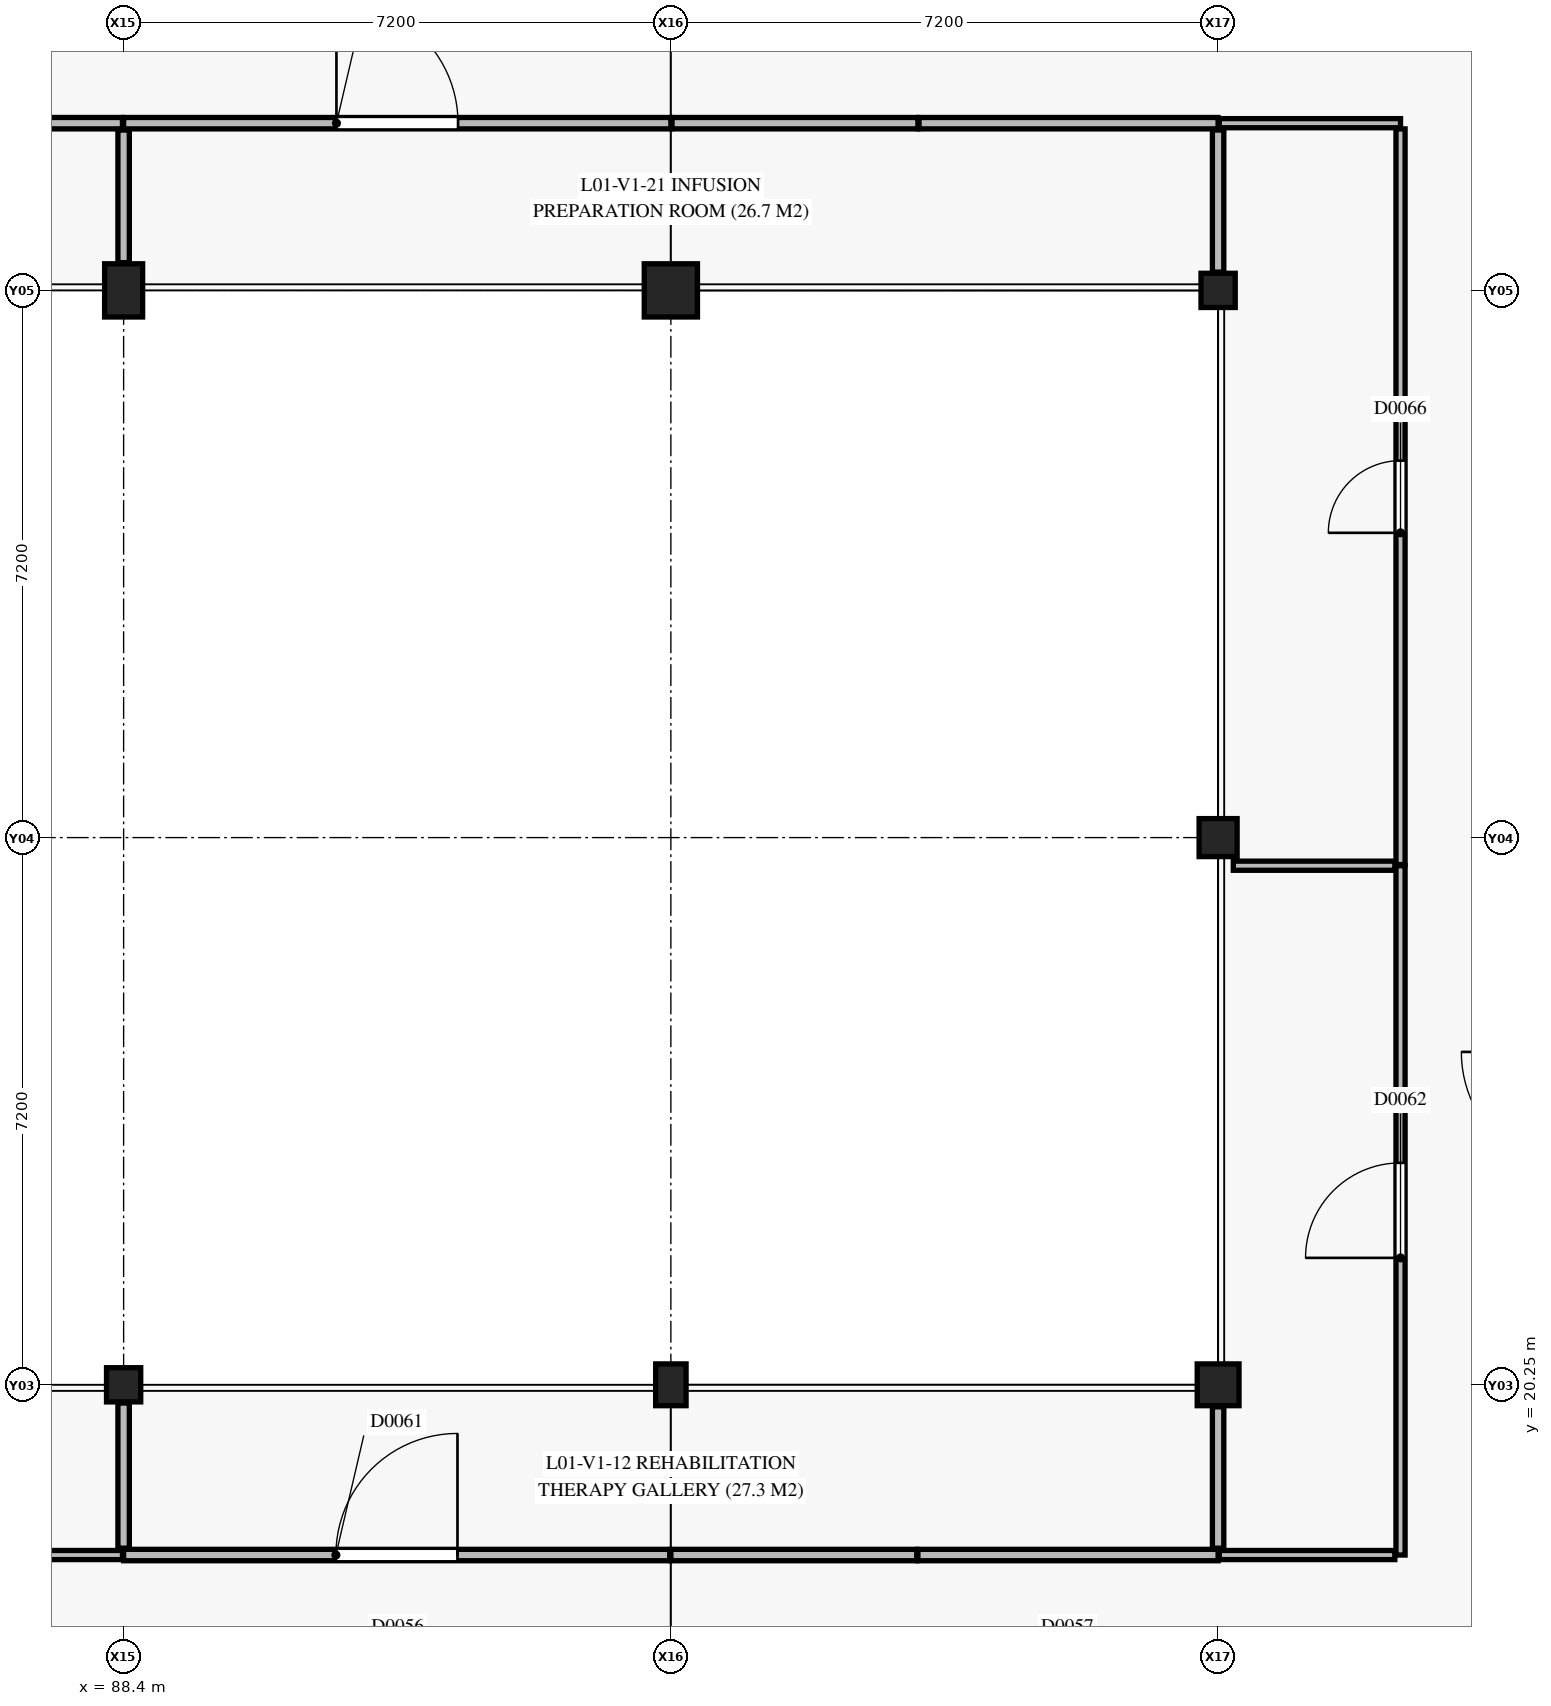
"""IFC4 building model, lengths in metres.
Left out: names, types, materials, properties, quantities, classifications, styles, units other than length and angle.
Written with IfcOpenShell. Run it as: python <this file> out.ifc"""

import sys

from ifc_helpers import new_model, si_unit, direction, frame, frame_2d, origin, origin_2d, place, context, subcontext, project, spatial, rectangle, extrude, element, fill, save


model = new_model("IFC4")
c1 = context("Model", 3, precision=1e-05, world=origin(), true_north=direction((0.0, 1.0)))
c2 = subcontext(c1, "Body", "Model", "MODEL_VIEW")
j1 = project(units=[si_unit("LENGTHUNIT", "METRE"), si_unit("PLANEANGLEUNIT", "RADIAN")], contexts=[c1])
p1 = place(None, origin())
s1 = spatial("IfcSite", under=j1, at=p1, CompositionType="ELEMENT")
p2 = place(p1, origin())
s2 = spatial("IfcBuilding", under=s1, at=p2, CompositionType="ELEMENT")
p3 = place(p2, frame((0.0, 0.0, 4.8)))
s3 = spatial("IfcBuildingStorey", under=s2, at=p3, CompositionType="ELEMENT", Elevation=4.8)
p4 = place(p3, frame((88.4, 20.25, 0.0), z_axis=(0.0, 0.0, 1.0), x_axis=(1.0, 0.0, 0.0)))
e1 = element("IfcColumn", 1, at=p4, inside=s3, PredefinedType="COLUMN", context=c2, shape_type="SweptSolid", body=[
    extrude(rectangle(XDim=0.45, YDim=0.45, at=origin_2d()), origin(), (0.0, 0.0, 1.0), 4.05),
])
p5 = place(p3, frame((88.4, 34.65, 0.0), z_axis=(0.0, 0.0, 1.0), x_axis=(1.0, 0.0, 0.0)))
e2 = element("IfcColumn", 2, at=p5, inside=s3, PredefinedType="COLUMN", context=c2, shape_type="SweptSolid", body=[
    extrude(rectangle(XDim=0.5, YDim=0.7, at=origin_2d()), origin(), (0.0, 0.0, 1.0), 4.05),
])
p6 = place(p3, frame((95.6, 20.25, 0.0), z_axis=(0.0, 0.0, 1.0), x_axis=(1.0, 0.0, 0.0)))
e3 = element("IfcColumn", 3, at=p6, inside=s3, PredefinedType="COLUMN", context=c2, shape_type="SweptSolid", body=[
    extrude(rectangle(XDim=0.4, YDim=0.55, at=origin_2d()), origin(), (0.0, 0.0, 1.0), 4.05),
])
p7 = place(p3, frame((95.6, 34.65, 0.0), z_axis=(0.0, 0.0, 1.0), x_axis=(1.0, 0.0, 0.0)))
e4 = element("IfcColumn", 4, at=p7, inside=s3, PredefinedType="COLUMN", context=c2, shape_type="SweptSolid", body=[
    extrude(rectangle(XDim=0.7, YDim=0.7, at=origin_2d()), origin(), (0.0, 0.0, 1.0), 4.05),
])
p8 = place(p3, frame((102.8, 20.25, 0.0), z_axis=(0.0, 0.0, 1.0), x_axis=(1.0, 0.0, 0.0)))
e5 = element("IfcColumn", 5, at=p8, inside=s3, PredefinedType="COLUMN", context=c2, shape_type="SweptSolid", body=[
    extrude(rectangle(XDim=0.55, YDim=0.55, at=origin_2d()), origin(), (0.0, 0.0, 1.0), 4.05),
])
p9 = place(p3, frame((102.8, 27.45, 0.0), z_axis=(0.0, 0.0, 1.0), x_axis=(1.0, 0.0, 0.0)))
e6 = element("IfcColumn", 6, at=p9, inside=s3, PredefinedType="COLUMN", context=c2, shape_type="SweptSolid", body=[
    extrude(rectangle(XDim=0.5, YDim=0.5, at=origin_2d()), origin(), (0.0, 0.0, 1.0), 4.05),
])
p10 = place(p3, frame((102.8, 34.65, 0.0), z_axis=(0.0, 0.0, 1.0), x_axis=(1.0, 0.0, 0.0)))
e7 = element("IfcColumn", 7, at=p10, inside=s3, PredefinedType="COLUMN", context=c2, shape_type="SweptSolid", body=[
    extrude(rectangle(XDim=0.45, YDim=0.45, at=origin_2d()), origin(), (0.0, 0.0, 1.0), 4.05),
])
p11 = place(p3, frame((88.4, 36.85, 0.0), z_axis=(0.0, 0.0, 1.0), x_axis=(1.0, 0.0, 0.0)))
e8 = element("IfcWall", 8, at=p11, inside=s3, PredefinedType="PARTITIONING", context=c2, shape_type="SweptSolid", body=[
    extrude(rectangle(XDim=7.2, YDim=0.15, at=frame_2d((3.6, 0.0))), origin(), (0.0, 0.0, 1.0), 3.95),
])
p12 = place(p11, frame((2.8, 0.0, 0.0)))
e9 = element("IfcOpeningElement", 9, at=p12, cuts=e8, PredefinedType="OPENING", context=c2, shape_type="SweptSolid", body=[
    extrude(rectangle(XDim=1.6, YDim=2.25, at=frame_2d((0.8, 1.125))), frame((0.0, 0.085, 0.0), z_axis=(0.0, -1.0, 0.0), x_axis=(1.0, 0.0, 0.0)), (0.0, 0.0, 1.0), 0.17),
])
p13 = place(p3, frame((95.615, 36.85, 0.0), z_axis=(0.0, 0.0, 1.0), x_axis=(1.0, 0.0, 0.0)))
e10 = element("IfcWall", 10, at=p13, inside=s3, PredefinedType="PARTITIONING", context=c2, shape_type="SweptSolid", body=[
    extrude(rectangle(XDim=3.235, YDim=0.15, at=frame_2d((1.618, 0.0))), origin(), (0.0, 0.0, 1.0), 3.95),
])
p14 = place(p3, frame((98.865, 36.85, 0.0), z_axis=(0.0, 0.0, 1.0), x_axis=(1.0, 0.0, 0.0)))
e11 = element("IfcWall", 11, at=p14, inside=s3, PredefinedType="PARTITIONING", context=c2, shape_type="SweptSolid", body=[
    extrude(rectangle(XDim=3.935, YDim=0.15, at=frame_2d((1.968, 0.0))), origin(), (0.0, 0.0, 1.0), 3.95),
])
p15 = place(p3, frame((98.85, 18.01, 0.0), z_axis=(0.0, 0.0, 1.0), x_axis=(1.0, 0.0, 0.0)))
e12 = element("IfcWall", 12, at=p15, inside=s3, PredefinedType="PARTITIONING", context=c2, shape_type="SweptSolid", body=[
    extrude(rectangle(XDim=3.95, YDim=0.15, at=frame_2d((1.975, 0.0))), origin(), (0.0, 0.0, 1.0), 3.95),
])
p16 = place(p3, frame((95.6, 18.01, 0.0), z_axis=(0.0, 0.0, 1.0), x_axis=(1.0, 0.0, 0.0)))
e13 = element("IfcWall", 13, at=p16, inside=s3, PredefinedType="PARTITIONING", context=c2, shape_type="SweptSolid", body=[
    extrude(rectangle(XDim=3.235, YDim=0.15, at=frame_2d((1.617, 0.0))), origin(), (0.0, 0.0, 1.0), 3.95),
])
p17 = place(p3, frame((88.4, 18.01, 0.0), z_axis=(0.0, 0.0, 1.0), x_axis=(1.0, 0.0, 0.0)))
e14 = element("IfcWall", 14, at=p17, inside=s3, PredefinedType="PARTITIONING", context=c2, shape_type="SweptSolid", body=[
    extrude(rectangle(XDim=7.185, YDim=0.15, at=frame_2d((3.593, 0.0))), origin(), (0.0, 0.0, 1.0), 3.95),
])
p18 = place(p17, frame((2.792, 0.0, 0.0)))
e15 = element("IfcOpeningElement", 15, at=p18, cuts=e14, PredefinedType="OPENING", context=c2, shape_type="SweptSolid", body=[
    extrude(rectangle(XDim=1.6, YDim=2.25, at=frame_2d((0.8, 1.125))), frame((0.0, 0.085, 0.0), z_axis=(0.0, -1.0, 0.0), x_axis=(1.0, 0.0, 0.0)), (0.0, 0.0, 1.0), 0.17),
])
p19 = place(p3, frame((85.315, 36.85, 0.0), z_axis=(0.0, 0.0, 1.0), x_axis=(1.0, 0.0, 0.0)))
e16 = element("IfcWall", 16, at=p19, inside=s3, PredefinedType="PARTITIONING", context=c2, shape_type="SweptSolid", body=[
    extrude(rectangle(XDim=3.07, YDim=0.15, at=frame_2d((1.535, 0.0))), origin(), (0.0, 0.0, 1.0), 3.95),
])
p20 = place(p3, frame((85.3, 18.01, 0.0), z_axis=(0.0, 0.0, 1.0), x_axis=(1.0, 0.0, 0.0)))
e17 = element("IfcWall", 17, at=p20, inside=s3, PredefinedType="PARTITIONING", context=c2, shape_type="SweptSolid", body=[
    extrude(rectangle(XDim=3.085, YDim=0.12, at=frame_2d((1.542, 0.0))), origin(), (0.0, 0.0, 1.0), 3.95),
])
p21 = place(p3, frame((105.2, 18.01, 0.0), z_axis=(0.0, 0.0, 1.0), x_axis=(0.0, 1.0, 0.0)))
e18 = element("IfcWall", 18, at=p21, inside=s3, PredefinedType="PARTITIONING", context=c2, shape_type="SweptSolid", body=[
    extrude(rectangle(XDim=9.07, YDim=0.12, at=frame_2d((4.535, 0.0))), origin(), (0.0, 0.0, 1.0), 3.47),
])
p22 = place(p21, frame((3.91, 0.0, 0.0)))
e19 = element("IfcOpeningElement", 19, at=p22, cuts=e18, PredefinedType="OPENING", context=c2, shape_type="SweptSolid", body=[
    extrude(rectangle(XDim=1.25, YDim=2.15, at=frame_2d((0.625, 1.075))), frame((0.0, 0.07, 0.0), z_axis=(0.0, -1.0, 0.0), x_axis=(1.0, 0.0, 0.0)), (0.0, 0.0, 1.0), 0.14),
])
p23 = place(p3, frame((102.815, 18.01, 0.0), z_axis=(0.0, 0.0, 1.0), x_axis=(1.0, 0.0, 0.0)))
e20 = element("IfcWall", 20, at=p23, inside=s3, PredefinedType="PARTITIONING", context=c2, shape_type="SweptSolid", body=[
    extrude(rectangle(XDim=2.31, YDim=0.12, at=frame_2d((1.155, 0.0))), origin(), (0.0, 0.0, 1.0), 3.95),
])
p24 = place(p3, frame((102.815, 36.85, 0.0), z_axis=(0.0, 0.0, 1.0), x_axis=(1.0, 0.0, 0.0)))
e21 = element("IfcWall", 21, at=p24, inside=s3, PredefinedType="PARTITIONING", context=c2, shape_type="SweptSolid", body=[
    extrude(rectangle(XDim=2.385, YDim=0.12, at=frame_2d((1.192, 0.0))), origin(), (0.0, 0.0, 1.0), 3.95),
])
p25 = place(p3, frame((105.2, 27.095, 0.0), z_axis=(0.0, 0.0, 1.0), x_axis=(0.0, 1.0, 0.0)))
e22 = element("IfcWall", 22, at=p25, inside=s3, PredefinedType="PARTITIONING", context=c2, shape_type="SweptSolid", body=[
    extrude(rectangle(XDim=9.68, YDim=0.12, at=frame_2d((4.84, 0.0))), origin(), (0.0, 0.0, 1.0), 3.22),
])
p26 = place(p25, frame((4.365, 0.0, 0.0)))
e23 = element("IfcOpeningElement", 23, at=p26, cuts=e22, PredefinedType="OPENING", context=c2, shape_type="SweptSolid", body=[
    extrude(rectangle(XDim=0.95, YDim=2.1, at=frame_2d((0.475, 1.05))), frame((0.0, 0.07, 0.0), z_axis=(0.0, -1.0, 0.0), x_axis=(1.0, 0.0, 0.0)), (0.0, 0.0, 1.0), 0.14),
])
p27 = place(p3, frame((102.8, 34.89, 0.0), z_axis=(0.0, 0.0, 1.0), x_axis=(0.0, 1.0, 0.0)))
e24 = element("IfcWall", 24, at=p27, inside=s3, PredefinedType="PARTITIONING", context=c2, shape_type="SweptSolid", body=[
    extrude(rectangle(XDim=1.87, YDim=0.15, at=frame_2d((0.935, 0.0))), origin(), (0.0, 0.0, 1.0), 3.95),
])
p28 = place(p3, frame((88.4, 35.015, 0.0), z_axis=(0.0, 0.0, 1.0), x_axis=(0.0, 1.0, 0.0)))
e25 = element("IfcWall", 25, at=p28, inside=s3, PredefinedType="PARTITIONING", context=c2, shape_type="SweptSolid", body=[
    extrude(rectangle(XDim=1.745, YDim=0.15, at=frame_2d((0.873, 0.0))), origin(), (0.0, 0.0, 1.0), 3.95),
])
p29 = place(p3, frame((88.4, 18.1, 0.0), z_axis=(0.0, 0.0, 1.0), x_axis=(0.0, 1.0, 0.0)))
e26 = element("IfcWall", 26, at=p29, inside=s3, PredefinedType="PARTITIONING", context=c2, shape_type="SweptSolid", body=[
    extrude(rectangle(XDim=1.91, YDim=0.15, at=frame_2d((0.955, 0.0))), origin(), (0.0, 0.0, 1.0), 3.95),
])
p30 = place(p3, frame((102.8, 18.1, 0.0), z_axis=(0.0, 0.0, 1.0), x_axis=(0.0, 1.0, 0.0)))
e27 = element("IfcWall", 27, at=p30, inside=s3, PredefinedType="PARTITIONING", context=c2, shape_type="SweptSolid", body=[
    extrude(rectangle(XDim=1.86, YDim=0.15, at=frame_2d((0.93, 0.0))), origin(), (0.0, 0.0, 1.0), 3.95),
])
p31 = place(p3, frame((103.0, 27.08, 0.0), z_axis=(0.0, 0.0, 1.0), x_axis=(1.0, 0.0, 0.0)))
e28 = element("IfcWall", 28, at=p31, inside=s3, PredefinedType="PARTITIONING", context=c2, shape_type="SweptSolid", body=[
    extrude(rectangle(XDim=2.125, YDim=0.12, at=frame_2d((1.062, 0.0))), origin(), (0.0, 0.0, 1.0), 3.95),
])
p32 = place(p18, origin())
e29 = element("IfcDoor", 29, at=p32, inside=s3, OperationType="SINGLE_SWING_RIGHT", PredefinedType="DOOR", context=c2, shape_type="SweptSolid", body=[
    extrude(rectangle(XDim=1.6, YDim=2.25, at=frame_2d((0.8, 1.125))), frame((0.0, 0.025, 0.0), z_axis=(0.0, -1.0, 0.0), x_axis=(1.0, 0.0, 0.0)), (0.0, 0.0, 1.0), 0.05),
])
fill(e15, e29)
p33 = place(p22, origin())
e30 = element("IfcDoor", 30, at=p33, inside=s3, OperationType="SINGLE_SWING_LEFT", PredefinedType="DOOR", context=c2, shape_type="SweptSolid", body=[
    extrude(rectangle(XDim=1.25, YDim=2.15, at=frame_2d((0.625, 1.075))), frame((0.0, 0.025, 0.0), z_axis=(0.0, -1.0, 0.0), x_axis=(1.0, 0.0, 0.0)), (0.0, 0.0, 1.0), 0.05),
])
fill(e19, e30)
p34 = place(p26, origin())
e31 = element("IfcDoor", 31, at=p34, inside=s3, OperationType="SINGLE_SWING_LEFT", PredefinedType="DOOR", context=c2, shape_type="SweptSolid", body=[
    extrude(rectangle(XDim=0.95, YDim=2.1, at=frame_2d((0.475, 1.05))), frame((0.0, 0.025, 0.0), z_axis=(0.0, -1.0, 0.0), x_axis=(1.0, 0.0, 0.0)), (0.0, 0.0, 1.0), 0.05),
])
fill(e23, e31)
p35 = place(p12, origin())
e32 = element("IfcDoor", 32, at=p35, inside=s3, OperationType="SINGLE_SWING_LEFT", PredefinedType="DOOR", context=c2, shape_type="SweptSolid", body=[
    extrude(rectangle(XDim=1.6, YDim=2.25, at=frame_2d((0.8, 1.125))), frame((0.0, 0.025, 0.0), z_axis=(0.0, -1.0, 0.0), x_axis=(1.0, 0.0, 0.0)), (0.0, 0.0, 1.0), 0.05),
])
fill(e9, e32)
save(model, sys.argv[1])
